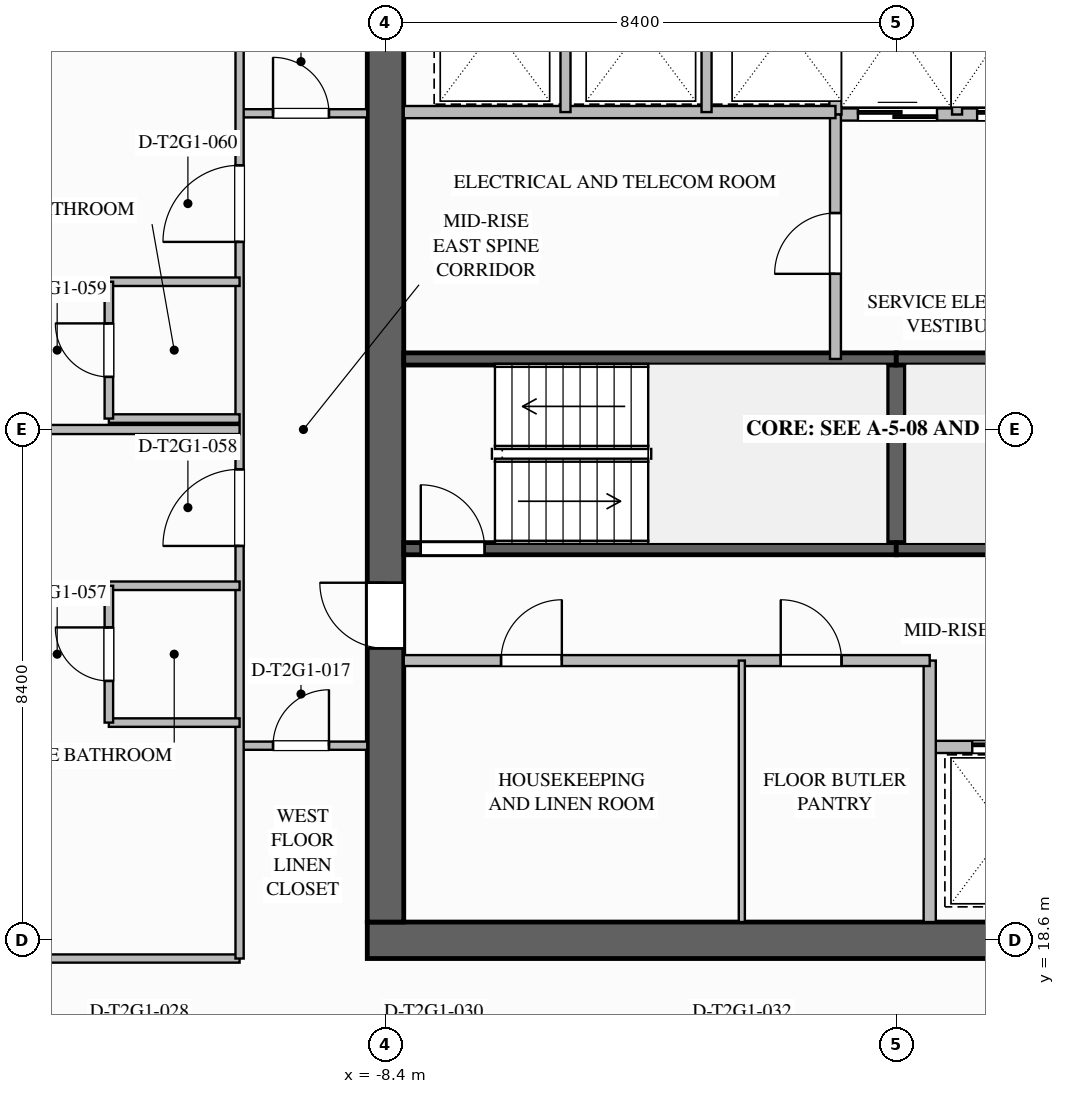
"""IFC4 building model, lengths in metres.
Left out: names, types, materials, properties, quantities, classifications, styles, units other than length and angle.
Written with IfcOpenShell. Run it as: python <this file> out.ifc"""

import sys

from ifc_helpers import new_model, si_unit, direction, frame, frame_2d, origin, place, context, subcontext, project, spatial, rectangle, extrude, element, fill, save


model = new_model("IFC4")
c1 = context("Model", 3, precision=1e-05, world=origin(), true_north=direction((0.0, 1.0)))
c2 = subcontext(c1, "Body", "Model", "MODEL_VIEW")
j1 = project(units=[si_unit("LENGTHUNIT", "METRE"), si_unit("PLANEANGLEUNIT", "RADIAN")], contexts=[c1])
p1 = place(None, origin())
s1 = spatial("IfcSite", under=j1, at=p1, CompositionType="ELEMENT")
p2 = place(p1, origin())
s2 = spatial("IfcBuilding", under=s1, at=p2, CompositionType="ELEMENT")
p3 = place(p2, frame((0.0, 0.0, 91.8)))
s3 = spatial("IfcBuildingStorey", under=s2, at=p3, CompositionType="ELEMENT", Elevation=91.8)
p4 = place(p3, frame((8.7, 18.6, 0.0), z_axis=(0.0, 0.0, 1.0), x_axis=(-1.0, 0.0, 0.0)))
e1 = element("IfcWall", 1, at=p4, inside=s3, PredefinedType="SHEAR", context=c2, shape_type="SweptSolid", body=[
    extrude(rectangle(XDim=17.4, YDim=0.6, at=frame_2d((8.7, 0.0))), origin(), (0.0, 0.0, 1.0), 3.5),
])
p5 = place(p3, frame((-8.4, 18.9, 0.0), z_axis=(0.0, 0.0, 1.0), x_axis=(0.0, 1.0, 0.0)))
e2 = element("IfcWall", 2, at=p5, inside=s3, PredefinedType="SHEAR", context=c2, shape_type="SweptSolid", body=[
    extrude(rectangle(XDim=16.2, YDim=0.6, at=frame_2d((8.1, 0.0))), origin(), (0.0, 0.0, 1.0), 3.5),
])
p6 = place(p5, frame((4.5, 0.0, 0.0)))
e3 = element("IfcOpeningElement", 3, at=p6, cuts=e2, PredefinedType="OPENING", context=c2, shape_type="SweptSolid", body=[
    extrude(rectangle(XDim=1.08, YDim=2.04, at=frame_2d((0.54, 1.02))), frame((0.0, 0.31, 0.0), z_axis=(0.0, -1.0, 0.0), x_axis=(1.0, 0.0, 0.0)), (0.0, 0.0, 1.0), 0.62),
])
p7 = place(p3, frame((0.0, 25.04, 0.0), z_axis=(0.0, 0.0, 1.0), x_axis=(0.0, 1.0, 0.0)))
e4 = element("IfcWall", 4, at=p7, inside=s3, PredefinedType="SOLIDWALL", context=c2, shape_type="SweptSolid", body=[
    extrude(rectangle(XDim=3.12, YDim=0.3, at=frame_2d((1.56, 0.0))), origin(), (0.0, 0.0, 1.0), 3.24),
])
p8 = place(p3, frame((-8.1, 25.04, 0.0), z_axis=(0.0, 0.0, 1.0), x_axis=(1.0, 0.0, 0.0)))
e5 = element("IfcWall", 5, at=p8, inside=s3, PredefinedType="SOLIDWALL", context=c2, shape_type="SweptSolid", body=[
    extrude(rectangle(XDim=8.1, YDim=0.2, at=frame_2d((4.05, 0.0))), origin(), (0.0, 0.0, 1.0), 3.24),
])
p9 = place(p8, frame((0.28, 0.0, 0.0)))
e6 = element("IfcOpeningElement", 6, at=p9, cuts=e5, PredefinedType="OPENING", context=c2, shape_type="SweptSolid", body=[
    extrude(rectangle(XDim=1.05, YDim=2.1, at=frame_2d((0.525, 1.05))), frame((0.0, 0.11, 0.0), z_axis=(0.0, -1.0, 0.0), x_axis=(1.0, 0.0, 0.0)), (0.0, 0.0, 1.0), 0.22),
])
for number, where, z_axis, x_axis in (
    (7, (-8.1, 28.16, 0.0), (0.0, 0.0, 1.0), (1.0, 0.0, 0.0)),
    (8, (0.0, 25.04, 0.0), (0.0, 0.0, 1.0), (1.0, 0.0, 0.0)),
):
    element("IfcWall", number, at=place(p3, frame(where, z_axis=z_axis, x_axis=x_axis)), inside=s3, PredefinedType="SOLIDWALL", context=c2, shape_type="SweptSolid", body=[
        extrude(rectangle(XDim=8.1, YDim=0.2, at=frame_2d((4.05, 0.0))), origin(), (0.0, 0.0, 1.0), 3.24),
    ])
p10 = place(p3, frame((8.1, 28.16, 0.0), z_axis=(0.0, 0.0, 1.0), x_axis=(-1.0, 0.0, 0.0)))
e9 = element("IfcWall", 9, at=p10, inside=s3, PredefinedType="SOLIDWALL", context=c2, shape_type="SweptSolid", body=[
    extrude(rectangle(XDim=8.1, YDim=0.2, at=frame_2d((4.05, 0.0))), origin(), (0.0, 0.0, 1.0), 3.24),
])
p11 = place(p10, frame((0.28, 0.0, 0.0)))
e10 = element("IfcOpeningElement", 10, at=p11, cuts=e9, PredefinedType="OPENING", context=c2, shape_type="SweptSolid", body=[
    extrude(rectangle(XDim=1.05, YDim=2.1, at=frame_2d((0.525, 1.05))), frame((0.0, 0.11, 0.0), z_axis=(0.0, -1.0, 0.0), x_axis=(1.0, 0.0, 0.0)), (0.0, 0.0, 1.0), 0.22),
])
p12 = place(p3, frame((-1.0, 32.18, 0.0), z_axis=(0.0, 0.0, 1.0), x_axis=(1.0, 0.0, 0.0)))
e11 = element("IfcWall", 11, at=p12, inside=s3, PredefinedType="SOLIDWALL", context=c2, shape_type="SweptSolid", body=[
    extrude(rectangle(XDim=4.1, YDim=0.2, at=frame_2d((2.05, 0.0))), origin(), (0.0, 0.0, 1.0), 3.24),
])
p13 = place(p12, frame((0.37, 0.0, 0.0)))
e12 = element("IfcOpeningElement", 12, at=p13, cuts=e11, PredefinedType="OPENING", context=c2, shape_type="SweptSolid", body=[
    extrude(rectangle(XDim=1.3, YDim=2.2, at=frame_2d((0.65, 1.1))), frame((0.0, 0.11, 0.0), z_axis=(0.0, -1.0, 0.0), x_axis=(1.0, 0.0, 0.0)), (0.0, 0.0, 1.0), 0.22),
])
p14 = place(p12, frame((2.33, 0.0, 0.0)))
e13 = element("IfcOpeningElement", 13, at=p14, cuts=e11, PredefinedType="OPENING", context=c2, shape_type="SweptSolid", body=[
    extrude(rectangle(XDim=1.3, YDim=2.2, at=frame_2d((0.65, 1.1))), frame((0.0, 0.11, 0.0), z_axis=(0.0, -1.0, 0.0), x_axis=(1.0, 0.0, 0.0)), (0.0, 0.0, 1.0), 0.22),
])
p15 = place(p3, frame((-1.0, 32.18, 0.0), z_axis=(0.0, 0.0, 1.0), x_axis=(0.0, 1.0, 0.0)))
e14 = element("IfcWall", 14, at=p15, inside=s3, PredefinedType="SOLIDWALL", context=c2, shape_type="SweptSolid", body=[
    extrude(rectangle(XDim=2.92, YDim=0.2, at=frame_2d((1.46, 0.0))), origin(), (0.0, 0.0, 1.0), 3.24),
])
p16 = place(p3, frame((1.0, 32.18, 0.0), z_axis=(0.0, 0.0, 1.0), x_axis=(0.0, 1.0, 0.0)))
e15 = element("IfcWall", 15, at=p16, inside=s3, PredefinedType="PARTITIONING", context=c2, shape_type="SweptSolid", body=[
    extrude(rectangle(XDim=2.92, YDim=0.165, at=frame_2d((1.46, 0.0))), origin(), (0.0, 0.0, 1.0), 3.24),
])
p17 = place(p3, frame((-1.0, 28.16, 0.0), z_axis=(0.0, 0.0, 1.0), x_axis=(0.0, 1.0, 0.0)))
e16 = element("IfcWall", 16, at=p17, inside=s3, PredefinedType="SOLIDWALL", context=c2, shape_type="SweptSolid", body=[
    extrude(rectangle(XDim=4.02, YDim=0.18, at=frame_2d((2.01, 0.0))), origin(), (0.0, 0.0, 1.0), 3.24),
])
p18 = place(p17, frame((1.4, 0.0, 0.0)))
e17 = element("IfcOpeningElement", 17, at=p18, cuts=e16, PredefinedType="OPENING", context=c2, shape_type="SweptSolid", body=[
    extrude(rectangle(XDim=1.0, YDim=2.1, at=frame_2d((0.5, 1.05))), frame((0.0, 0.1, 0.0), z_axis=(0.0, -1.0, 0.0), x_axis=(1.0, 0.0, 0.0)), (0.0, 0.0, 1.0), 0.2),
])
p19 = place(p3, frame((-8.1, 32.22, 0.0), z_axis=(0.0, 0.0, 1.0), x_axis=(1.0, 0.0, 0.0)))
e18 = element("IfcWall", 18, at=p19, inside=s3, PredefinedType="SOLIDWALL", context=c2, shape_type="SweptSolid", body=[
    extrude(rectangle(XDim=7.1, YDim=0.2, at=frame_2d((3.55, 0.0))), origin(), (0.0, 0.0, 1.0), 3.24),
])
for number, where, z_axis, x_axis in (
    (19, (-5.44, 32.22, 0.0), (0.0, 0.0, 1.0), (0.0, 1.0, 0.0)),
    (20, (-3.12, 32.22, 0.0), (0.0, 0.0, 1.0), (0.0, 1.0, 0.0)),
):
    element("IfcWall", number, at=place(p3, frame(where, z_axis=z_axis, x_axis=x_axis)), inside=s3, PredefinedType="PARTITIONING", context=c2, shape_type="SweptSolid", body=[
        extrude(rectangle(XDim=2.88, YDim=0.165, at=frame_2d((1.44, 0.0))), origin(), (0.0, 0.0, 1.0), 3.24),
    ])
p20 = place(p3, frame((8.1, 21.78, 0.0), z_axis=(0.0, 0.0, 1.0), x_axis=(-1.0, 0.0, 0.0)))
e21 = element("IfcWall", 21, at=p20, inside=s3, PredefinedType="SOLIDWALL", context=c2, shape_type="SweptSolid", body=[
    extrude(rectangle(XDim=7.55, YDim=0.2, at=frame_2d((3.775, 0.0))), origin(), (0.0, 0.0, 1.0), 3.24),
])
p21 = place(p20, frame((5.75, 0.0, 0.0)))
e22 = element("IfcOpeningElement", 22, at=p21, cuts=e21, PredefinedType="OPENING", context=c2, shape_type="SweptSolid", body=[
    extrude(rectangle(XDim=1.1, YDim=2.2, at=frame_2d((0.55, 1.1))), frame((0.0, 0.11, 0.0), z_axis=(0.0, -1.0, 0.0), x_axis=(1.0, 0.0, 0.0)), (0.0, 0.0, 1.0), 0.22),
])
p22 = place(p20, frame((3.35, 0.0, 0.0)))
e23 = element("IfcOpeningElement", 23, at=p22, cuts=e21, PredefinedType="OPENING", context=c2, shape_type="SweptSolid", body=[
    extrude(rectangle(XDim=1.1, YDim=2.2, at=frame_2d((0.55, 1.1))), frame((0.0, 0.11, 0.0), z_axis=(0.0, -1.0, 0.0), x_axis=(1.0, 0.0, 0.0)), (0.0, 0.0, 1.0), 0.22),
])
p23 = place(p20, frame((0.95, 0.0, 0.0)))
e24 = element("IfcOpeningElement", 24, at=p23, cuts=e21, PredefinedType="OPENING", context=c2, shape_type="SweptSolid", body=[
    extrude(rectangle(XDim=1.1, YDim=2.2, at=frame_2d((0.55, 1.1))), frame((0.0, 0.11, 0.0), z_axis=(0.0, -1.0, 0.0), x_axis=(1.0, 0.0, 0.0)), (0.0, 0.0, 1.0), 0.22),
])
p24 = place(p3, frame((0.55, 18.9, 0.0), z_axis=(0.0, 0.0, 1.0), x_axis=(0.0, 1.0, 0.0)))
e25 = element("IfcWall", 25, at=p24, inside=s3, PredefinedType="SOLIDWALL", context=c2, shape_type="SweptSolid", body=[
    extrude(rectangle(XDim=4.3, YDim=0.2, at=frame_2d((2.15, 0.0))), origin(), (0.0, 0.0, 1.0), 3.24),
])
p25 = place(p3, frame((-8.1, 23.2, 0.0), z_axis=(0.0, 0.0, 1.0), x_axis=(1.0, 0.0, 0.0)))
e26 = element("IfcWall", 26, at=p25, inside=s3, PredefinedType="SOLIDWALL", context=c2, shape_type="SweptSolid", body=[
    extrude(rectangle(XDim=8.65, YDim=0.18, at=frame_2d((4.325, 0.0))), origin(), (0.0, 0.0, 1.0), 3.24),
])
p26 = place(p25, frame((1.6, 0.0, 0.0)))
e27 = element("IfcOpeningElement", 27, at=p26, cuts=e26, PredefinedType="OPENING", context=c2, shape_type="SweptSolid", body=[
    extrude(rectangle(XDim=1.0, YDim=2.1, at=frame_2d((0.5, 1.05))), frame((0.0, 0.1, 0.0), z_axis=(0.0, -1.0, 0.0), x_axis=(1.0, 0.0, 0.0)), (0.0, 0.0, 1.0), 0.2),
])
p27 = place(p25, frame((6.2, 0.0, 0.0)))
e28 = element("IfcOpeningElement", 28, at=p27, cuts=e26, PredefinedType="OPENING", context=c2, shape_type="SweptSolid", body=[
    extrude(rectangle(XDim=1.0, YDim=2.1, at=frame_2d((0.5, 1.05))), frame((0.0, 0.1, 0.0), z_axis=(0.0, -1.0, 0.0), x_axis=(1.0, 0.0, 0.0)), (0.0, 0.0, 1.0), 0.2),
])
p28 = place(p3, frame((-2.54, 18.9, 0.0), z_axis=(0.0, 0.0, 1.0), x_axis=(0.0, 1.0, 0.0)))
e29 = element("IfcWall", 29, at=p28, inside=s3, PredefinedType="PARTITIONING", context=c2, shape_type="SweptSolid", body=[
    extrude(rectangle(XDim=4.3, YDim=0.1, at=frame_2d((2.15, 0.0))), origin(), (0.0, 0.0, 1.0), 3.24),
])
p29 = place(p3, frame((-10.8, 21.8, 0.0), z_axis=(0.0, 0.0, 1.0), x_axis=(1.0, 0.0, 0.0)))
e30 = element("IfcWall", 30, at=p29, inside=s3, PredefinedType="PARTITIONING", context=c2, shape_type="SweptSolid", body=[
    extrude(rectangle(XDim=2.1, YDim=0.135, at=frame_2d((1.05, 0.0))), origin(), (0.0, 0.0, 1.0), 3.24),
])
p30 = place(p29, frame((0.55, 0.0, 0.0)))
e31 = element("IfcOpeningElement", 31, at=p30, cuts=e30, PredefinedType="OPENING", context=c2, shape_type="SweptSolid", body=[
    extrude(rectangle(XDim=0.92, YDim=2.1, at=frame_2d((0.46, 1.05))), frame((0.0, 0.077, 0.0), z_axis=(0.0, -1.0, 0.0), x_axis=(1.0, 0.0, 0.0)), (0.0, 0.0, 1.0), 0.155),
])
p31 = place(p3, frame((-10.8, 32.2, 0.0), z_axis=(0.0, 0.0, 1.0), x_axis=(1.0, 0.0, 0.0)))
e32 = element("IfcWall", 32, at=p31, inside=s3, PredefinedType="PARTITIONING", context=c2, shape_type="SweptSolid", body=[
    extrude(rectangle(XDim=2.1, YDim=0.135, at=frame_2d((1.05, 0.0))), origin(), (0.0, 0.0, 1.0), 3.24),
])
p32 = place(p31, frame((0.55, 0.0, 0.0)))
e33 = element("IfcOpeningElement", 33, at=p32, cuts=e32, PredefinedType="OPENING", context=c2, shape_type="SweptSolid", body=[
    extrude(rectangle(XDim=0.92, YDim=2.1, at=frame_2d((0.46, 1.05))), frame((0.0, 0.077, 0.0), z_axis=(0.0, -1.0, 0.0), x_axis=(1.0, 0.0, 0.0)), (0.0, 0.0, 1.0), 0.155),
])
p33 = place(p3, frame((-16.2, 18.3, 0.0), z_axis=(0.0, 0.0, 1.0), x_axis=(1.0, 0.0, 0.0)))
e34 = element("IfcWall", 34, at=p33, inside=s3, PredefinedType="PARTITIONING", context=c2, shape_type="SweptSolid", body=[
    extrude(rectangle(XDim=5.4, YDim=0.135, at=frame_2d((2.7, 0.0))), origin(), (0.0, 0.0, 1.0), 3.24),
])
p34 = place(p3, frame((-10.8, 18.3, 0.0), z_axis=(0.0, 0.0, 1.0), x_axis=(0.0, 1.0, 0.0)))
e35 = element("IfcWall", 35, at=p34, inside=s3, PredefinedType="PARTITIONING", context=c2, shape_type="SweptSolid", body=[
    extrude(rectangle(XDim=17.4, YDim=0.135, at=frame_2d((8.7, 0.0))), origin(), (0.0, 0.0, 1.0), 3.24),
])
p35 = place(p34, frame((6.785, 0.0, 0.0)))
e36 = element("IfcOpeningElement", 36, at=p35, cuts=e35, PredefinedType="OPENING", context=c2, shape_type="SweptSolid", body=[
    extrude(rectangle(XDim=1.26, YDim=2.2, at=frame_2d((0.63, 1.1))), frame((0.0, 0.077, 0.0), z_axis=(0.0, -1.0, 0.0), x_axis=(1.0, 0.0, 0.0)), (0.0, 0.0, 1.0), 0.155),
])
p36 = place(p34, frame((11.785, 0.0, 0.0)))
e37 = element("IfcOpeningElement", 37, at=p36, cuts=e35, PredefinedType="OPENING", context=c2, shape_type="SweptSolid", body=[
    extrude(rectangle(XDim=1.26, YDim=2.2, at=frame_2d((0.63, 1.1))), frame((0.0, 0.077, 0.0), z_axis=(0.0, -1.0, 0.0), x_axis=(1.0, 0.0, 0.0)), (0.0, 0.0, 1.0), 0.155),
])
p37 = place(p3, frame((-26.2, 27.0, 0.0), z_axis=(0.0, 0.0, 1.0), x_axis=(1.0, 0.0, 0.0)))
e38 = element("IfcWall", 38, at=p37, inside=s3, PredefinedType="PARTITIONING", context=c2, shape_type="SweptSolid", body=[
    extrude(rectangle(XDim=15.4, YDim=0.15, at=frame_2d((7.7, 0.0))), origin(), (0.0, 0.0, 1.0), 2.452),
])
for number, where, z_axis, x_axis in (
    (39, (-10.8, 22.18, 0.0), (0.0, 0.0, 1.0), (-1.0, 0.0, 0.0)),
    (40, (-10.8, 24.43, 0.0), (0.0, 0.0, 1.0), (-1.0, 0.0, 0.0)),
):
    element("IfcWall", number, at=place(p3, frame(where, z_axis=z_axis, x_axis=x_axis)), inside=s3, PredefinedType="PLUMBINGWALL", context=c2, shape_type="SweptSolid", body=[
        extrude(rectangle(XDim=2.15, YDim=0.14, at=frame_2d((1.075, 0.0))), origin(), (0.0, 0.0, 1.0), 3.24),
    ])
p38 = place(p3, frame((-12.95, 22.18, 0.0), z_axis=(0.0, 0.0, 1.0), x_axis=(0.0, 1.0, 0.0)))
e41 = element("IfcWall", 41, at=p38, inside=s3, PredefinedType="PLUMBINGWALL", context=c2, shape_type="SweptSolid", body=[
    extrude(rectangle(XDim=2.25, YDim=0.14, at=frame_2d((1.125, 0.0))), origin(), (0.0, 0.0, 1.0), 3.24),
])
p39 = place(p38, frame((0.685, 0.0, 0.0)))
e42 = element("IfcOpeningElement", 42, at=p39, cuts=e41, PredefinedType="OPENING", context=c2, shape_type="SweptSolid", body=[
    extrude(rectangle(XDim=0.88, YDim=2.1, at=frame_2d((0.44, 1.05))), frame((0.0, 0.08, 0.0), z_axis=(0.0, -1.0, 0.0), x_axis=(1.0, 0.0, 0.0)), (0.0, 0.0, 1.0), 0.16),
])
p40 = place(p3, frame((-10.8, 27.18, 0.0), z_axis=(0.0, 0.0, 1.0), x_axis=(-1.0, 0.0, 0.0)))
e43 = element("IfcWall", 43, at=p40, inside=s3, PredefinedType="PLUMBINGWALL", context=c2, shape_type="SweptSolid", body=[
    extrude(rectangle(XDim=2.15, YDim=0.14, at=frame_2d((1.075, 0.0))), origin(), (0.0, 0.0, 1.0), 2.617),
])
p41 = place(p3, frame((-10.8, 29.43, 0.0), z_axis=(0.0, 0.0, 1.0), x_axis=(-1.0, 0.0, 0.0)))
e44 = element("IfcWall", 44, at=p41, inside=s3, PredefinedType="PLUMBINGWALL", context=c2, shape_type="SweptSolid", body=[
    extrude(rectangle(XDim=2.15, YDim=0.14, at=frame_2d((1.075, 0.0))), origin(), (0.0, 0.0, 1.0), 3.24),
])
p42 = place(p3, frame((-12.95, 27.18, 0.0), z_axis=(0.0, 0.0, 1.0), x_axis=(0.0, 1.0, 0.0)))
e45 = element("IfcWall", 45, at=p42, inside=s3, PredefinedType="PLUMBINGWALL", context=c2, shape_type="SweptSolid", body=[
    extrude(rectangle(XDim=2.25, YDim=0.14, at=frame_2d((1.125, 0.0))), origin(), (0.0, 0.0, 1.0), 3.24),
])
p43 = place(p42, frame((0.685, 0.0, 0.0)))
e46 = element("IfcOpeningElement", 46, at=p43, cuts=e45, PredefinedType="OPENING", context=c2, shape_type="SweptSolid", body=[
    extrude(rectangle(XDim=0.88, YDim=2.1, at=frame_2d((0.44, 1.05))), frame((0.0, 0.08, 0.0), z_axis=(0.0, -1.0, 0.0), x_axis=(1.0, 0.0, 0.0)), (0.0, 0.0, 1.0), 0.16),
])
p44 = place(p9, origin())
e47 = element("IfcDoor", 47, at=p44, inside=s3, OperationType="SINGLE_SWING_LEFT", PredefinedType="DOOR", context=c2, shape_type="SweptSolid", body=[
    extrude(rectangle(XDim=1.05, YDim=2.1, at=frame_2d((0.525, 1.05))), frame((0.0, 0.025, 0.0), z_axis=(0.0, -1.0, 0.0), x_axis=(1.0, 0.0, 0.0)), (0.0, 0.0, 1.0), 0.05),
])
fill(e6, e47)
p45 = place(p13, origin())
e48 = element("IfcDoor", 48, at=p45, inside=s3, OperationType="SLIDING_TO_LEFT", PredefinedType="DOOR", context=c2, shape_type="SweptSolid", body=[
    extrude(rectangle(XDim=1.3, YDim=2.2, at=frame_2d((0.65, 1.1))), frame((0.0, 0.025, 0.0), z_axis=(0.0, -1.0, 0.0), x_axis=(1.0, 0.0, 0.0)), (0.0, 0.0, 1.0), 0.05),
])
fill(e12, e48)
p46 = place(p14, origin())
e49 = element("IfcDoor", 49, at=p46, inside=s3, OperationType="SLIDING_TO_LEFT", PredefinedType="DOOR", context=c2, shape_type="SweptSolid", body=[
    extrude(rectangle(XDim=1.3, YDim=2.2, at=frame_2d((0.65, 1.1))), frame((0.0, 0.025, 0.0), z_axis=(0.0, -1.0, 0.0), x_axis=(1.0, 0.0, 0.0)), (0.0, 0.0, 1.0), 0.05),
])
fill(e13, e49)
p47 = place(p18, origin())
e50 = element("IfcDoor", 50, at=p47, inside=s3, OperationType="SINGLE_SWING_LEFT", PredefinedType="DOOR", context=c2, shape_type="SweptSolid", body=[
    extrude(rectangle(XDim=1.0, YDim=2.1, at=frame_2d((0.5, 1.05))), frame((0.0, 0.025, 0.0), z_axis=(0.0, -1.0, 0.0), x_axis=(1.0, 0.0, 0.0)), (0.0, 0.0, 1.0), 0.05),
])
fill(e17, e50)
p48 = place(p21, origin())
e51 = element("IfcDoor", 51, at=p48, inside=s3, OperationType="SLIDING_TO_LEFT", PredefinedType="DOOR", context=c2, shape_type="SweptSolid", body=[
    extrude(rectangle(XDim=1.1, YDim=2.2, at=frame_2d((0.55, 1.1))), frame((0.0, 0.025, 0.0), z_axis=(0.0, -1.0, 0.0), x_axis=(1.0, 0.0, 0.0)), (0.0, 0.0, 1.0), 0.05),
])
fill(e22, e51)
p49 = place(p6, origin())
e52 = element("IfcDoor", 52, at=p49, inside=s3, OperationType="SINGLE_SWING_RIGHT", PredefinedType="DOOR", context=c2, shape_type="SweptSolid", body=[
    extrude(rectangle(XDim=1.08, YDim=2.04, at=frame_2d((0.54, 1.02))), frame((0.0, 0.025, 0.0), z_axis=(0.0, -1.0, 0.0), x_axis=(1.0, 0.0, 0.0)), (0.0, 0.0, 1.0), 0.05),
])
fill(e3, e52)
p50 = place(p26, origin())
e53 = element("IfcDoor", 53, at=p50, inside=s3, OperationType="SINGLE_SWING_RIGHT", PredefinedType="DOOR", context=c2, shape_type="SweptSolid", body=[
    extrude(rectangle(XDim=1.0, YDim=2.1, at=frame_2d((0.5, 1.05))), frame((0.0, 0.025, 0.0), z_axis=(0.0, -1.0, 0.0), x_axis=(1.0, 0.0, 0.0)), (0.0, 0.0, 1.0), 0.05),
])
fill(e27, e53)
p51 = place(p27, origin())
e54 = element("IfcDoor", 54, at=p51, inside=s3, OperationType="SINGLE_SWING_LEFT", PredefinedType="DOOR", context=c2, shape_type="SweptSolid", body=[
    extrude(rectangle(XDim=1.0, YDim=2.1, at=frame_2d((0.5, 1.05))), frame((0.0, 0.025, 0.0), z_axis=(0.0, -1.0, 0.0), x_axis=(1.0, 0.0, 0.0)), (0.0, 0.0, 1.0), 0.05),
])
fill(e28, e54)
p52 = place(p30, origin())
e55 = element("IfcDoor", 55, at=p52, inside=s3, OperationType="SINGLE_SWING_RIGHT", PredefinedType="DOOR", context=c2, shape_type="SweptSolid", body=[
    extrude(rectangle(XDim=0.92, YDim=2.1, at=frame_2d((0.46, 1.05))), frame((0.0, 0.025, 0.0), z_axis=(0.0, -1.0, 0.0), x_axis=(1.0, 0.0, 0.0)), (0.0, 0.0, 1.0), 0.05),
])
fill(e31, e55)
p53 = place(p32, origin())
e56 = element("IfcDoor", 56, at=p53, inside=s3, OperationType="SINGLE_SWING_LEFT", PredefinedType="DOOR", context=c2, shape_type="SweptSolid", body=[
    extrude(rectangle(XDim=0.92, YDim=2.1, at=frame_2d((0.46, 1.05))), frame((0.0, 0.025, 0.0), z_axis=(0.0, -1.0, 0.0), x_axis=(1.0, 0.0, 0.0)), (0.0, 0.0, 1.0), 0.05),
])
fill(e33, e56)
p54 = place(p39, origin())
e57 = element("IfcDoor", 57, at=p54, inside=s3, OperationType="SINGLE_SWING_RIGHT", PredefinedType="DOOR", context=c2, shape_type="SweptSolid", body=[
    extrude(rectangle(XDim=0.88, YDim=2.1, at=frame_2d((0.44, 1.05))), frame((0.0, 0.025, 0.0), z_axis=(0.0, -1.0, 0.0), x_axis=(1.0, 0.0, 0.0)), (0.0, 0.0, 1.0), 0.05),
])
fill(e42, e57)
p55 = place(p35, origin())
e58 = element("IfcDoor", 58, at=p55, inside=s3, OperationType="SINGLE_SWING_LEFT", PredefinedType="DOOR", context=c2, shape_type="SweptSolid", body=[
    extrude(rectangle(XDim=1.26, YDim=2.2, at=frame_2d((0.63, 1.1))), frame((0.0, 0.025, 0.0), z_axis=(0.0, -1.0, 0.0), x_axis=(1.0, 0.0, 0.0)), (0.0, 0.0, 1.0), 0.05),
])
fill(e36, e58)
p56 = place(p43, origin())
e59 = element("IfcDoor", 59, at=p56, inside=s3, OperationType="SINGLE_SWING_RIGHT", PredefinedType="DOOR", context=c2, shape_type="SweptSolid", body=[
    extrude(rectangle(XDim=0.88, YDim=2.1, at=frame_2d((0.44, 1.05))), frame((0.0, 0.025, 0.0), z_axis=(0.0, -1.0, 0.0), x_axis=(1.0, 0.0, 0.0)), (0.0, 0.0, 1.0), 0.05),
])
fill(e46, e59)
p57 = place(p36, origin())
e60 = element("IfcDoor", 60, at=p57, inside=s3, OperationType="SINGLE_SWING_LEFT", PredefinedType="DOOR", context=c2, shape_type="SweptSolid", body=[
    extrude(rectangle(XDim=1.26, YDim=2.2, at=frame_2d((0.63, 1.1))), frame((0.0, 0.025, 0.0), z_axis=(0.0, -1.0, 0.0), x_axis=(1.0, 0.0, 0.0)), (0.0, 0.0, 1.0), 0.05),
])
fill(e37, e60)
save(model, sys.argv[1])
